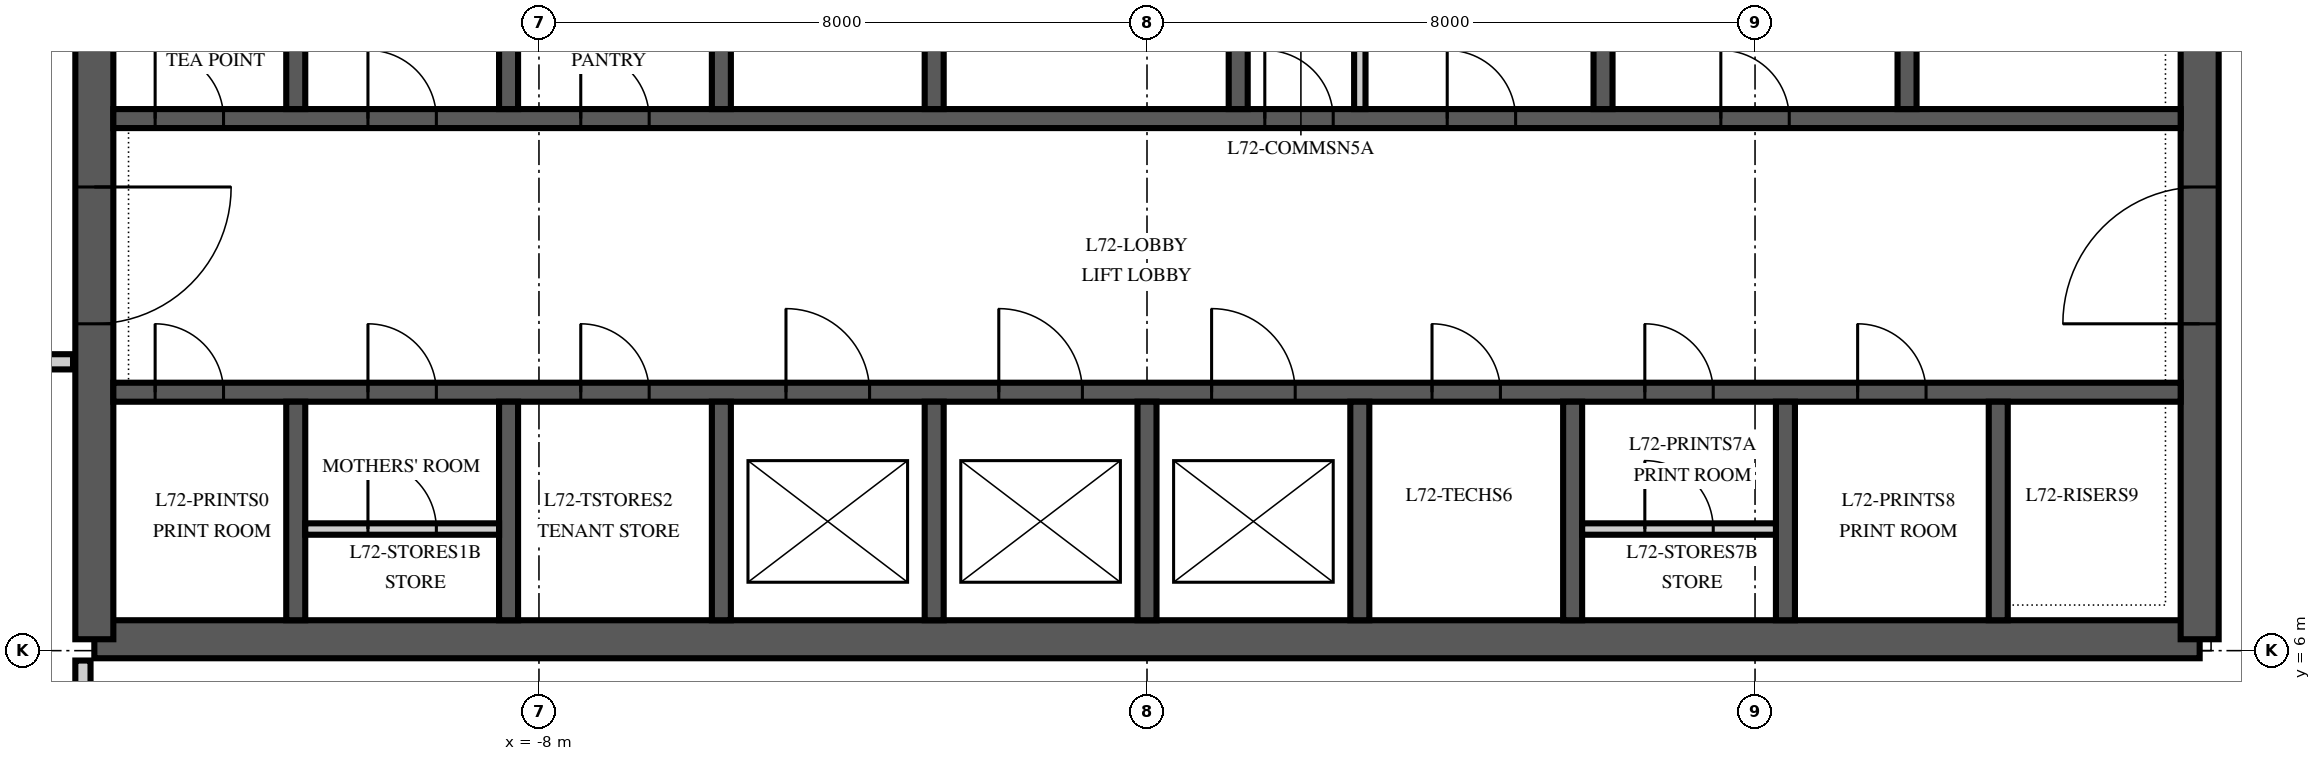
"""IFC4 building model, lengths in metres.
Left out: names, types, materials, properties, quantities, classifications, styles, units other than length and angle.
Written with IfcOpenShell. Run it as: python <this file> out.ifc"""

import sys

from ifc_helpers import new_model, si_unit, direction, frame, frame_2d, origin, place, context, subcontext, project, spatial, polyline, rectangle, outline, extrude, element, fill, save


model = new_model("IFC4")
c1 = context("Model", 3, precision=1e-05, world=origin(), true_north=direction((0.0, 1.0)))
c2 = subcontext(c1, "Body", "Model", "MODEL_VIEW")
j1 = project(units=[si_unit("LENGTHUNIT", "METRE"), si_unit("PLANEANGLEUNIT", "RADIAN")], contexts=[c1])
p1 = place(None, origin())
s1 = spatial("IfcSite", under=j1, at=p1, CompositionType="ELEMENT")
p2 = place(p1, origin())
s2 = spatial("IfcBuilding", under=s1, at=p2, CompositionType="ELEMENT")
p3 = place(p2, frame((0.0, 0.0, 308.0)))
s3 = spatial("IfcBuildingStorey", under=s2, at=p3, CompositionType="ELEMENT", Elevation=308.0)
p4 = place(p3, frame((-13.85, 6.15, 0.0), z_axis=(0.0, 0.0, 1.0), x_axis=(1.0, 0.0, 0.0)))
e1 = element("IfcWall", 1, at=p4, inside=s3, PredefinedType="SHEAR", context=c2, shape_type="SweptSolid", body=[
    extrude(rectangle(XDim=27.7, YDim=0.5, at=frame_2d((13.85, 0.0))), origin(), (0.0, 0.0, 1.0), 4.0),
])
p5 = place(p3, frame((13.85, 6.15, 0.0), z_axis=(0.0, 0.0, 1.0), x_axis=(0.0, 1.0, 0.0)))
e2 = element("IfcWall", 2, at=p5, inside=s3, PredefinedType="SHEAR", context=c2, shape_type="SweptSolid", body=[
    extrude(outline(polyline([(0.0, -0.25), (17.7, -0.25), (17.7, 0.0), (17.45, 0.0), (17.45, 0.25), (0.25, 0.25), (0.25, 0.0), (0.0, 0.0), (0.0, -0.25)])), origin(), (0.0, 0.0, 1.0), 4.0),
])
p6 = place(p5, frame((4.15, 0.0, 0.0)))
e3 = element("IfcOpeningElement", 3, at=p6, cuts=e2, PredefinedType="OPENING", context=c2, shape_type="SweptSolid", body=[
    extrude(rectangle(XDim=1.8, YDim=2.4, at=frame_2d((0.9, 1.2))), frame((0.0, 0.265, 0.0), z_axis=(0.0, -1.0, 0.0), x_axis=(1.0, 0.0, 0.0)), (0.0, 0.0, 1.0), 0.53),
])
p7 = place(p3, frame((-13.85, 23.85, 0.0), z_axis=(0.0, 0.0, 1.0), x_axis=(0.0, -1.0, 0.0)))
e4 = element("IfcWall", 4, at=p7, inside=s3, PredefinedType="SHEAR", context=c2, shape_type="SweptSolid", body=[
    extrude(outline(polyline([(0.0, -0.25), (17.7, -0.25), (17.7, 0.0), (17.45, 0.0), (17.45, 0.25), (0.25, 0.25), (0.25, 0.0), (0.0, 0.0), (0.0, -0.25)])), origin(), (0.0, 0.0, 1.0), 4.0),
])
p8 = place(p7, frame((11.75, 0.0, 0.0)))
e5 = element("IfcOpeningElement", 5, at=p8, cuts=e4, PredefinedType="OPENING", context=c2, shape_type="SweptSolid", body=[
    extrude(rectangle(XDim=1.8, YDim=2.4, at=frame_2d((0.9, 1.2))), frame((0.0, 0.265, 0.0), z_axis=(0.0, -1.0, 0.0), x_axis=(1.0, 0.0, 0.0)), (0.0, 0.0, 1.0), 0.53),
])
p9 = place(p3, frame((-13.6, 9.4, 0.0), z_axis=(0.0, 0.0, 1.0), x_axis=(1.0, 0.0, 0.0)))
e6 = element("IfcWall", 6, at=p9, inside=s3, PredefinedType="SHEAR", context=c2, shape_type="SweptSolid", body=[
    extrude(rectangle(XDim=27.2, YDim=0.25, at=frame_2d((13.6, 0.0))), origin(), (0.0, 0.0, 1.0), 4.0),
])
p10 = place(p9, frame((8.85, 0.0, 0.0)))
e7 = element("IfcOpeningElement", 7, at=p10, cuts=e6, PredefinedType="OPENING", context=c2, shape_type="SweptSolid", body=[
    extrude(rectangle(XDim=1.1, YDim=2.1, at=frame_2d((0.55, 1.05))), frame((0.0, 0.14, 0.0), z_axis=(0.0, -1.0, 0.0), x_axis=(1.0, 0.0, 0.0)), (0.0, 0.0, 1.0), 0.28),
])
p11 = place(p9, frame((11.65, 0.0, 0.0)))
e8 = element("IfcOpeningElement", 8, at=p11, cuts=e6, PredefinedType="OPENING", context=c2, shape_type="SweptSolid", body=[
    extrude(rectangle(XDim=1.1, YDim=2.1, at=frame_2d((0.55, 1.05))), frame((0.0, 0.14, 0.0), z_axis=(0.0, -1.0, 0.0), x_axis=(1.0, 0.0, 0.0)), (0.0, 0.0, 1.0), 0.28),
])
p12 = place(p9, frame((14.45, 0.0, 0.0)))
e9 = element("IfcOpeningElement", 9, at=p12, cuts=e6, PredefinedType="OPENING", context=c2, shape_type="SweptSolid", body=[
    extrude(rectangle(XDim=1.1, YDim=2.1, at=frame_2d((0.55, 1.05))), frame((0.0, 0.14, 0.0), z_axis=(0.0, -1.0, 0.0), x_axis=(1.0, 0.0, 0.0)), (0.0, 0.0, 1.0), 0.28),
])
p13 = place(p9, frame((0.55, 0.0, 0.0)))
e10 = element("IfcOpeningElement", 10, at=p13, cuts=e6, PredefinedType="OPENING", context=c2, shape_type="SweptSolid", body=[
    extrude(rectangle(XDim=0.9, YDim=2.1, at=frame_2d((0.45, 1.05))), frame((0.0, 0.14, 0.0), z_axis=(0.0, -1.0, 0.0), x_axis=(1.0, 0.0, 0.0)), (0.0, 0.0, 1.0), 0.28),
])
p14 = place(p9, frame((3.35, 0.0, 0.0)))
e11 = element("IfcOpeningElement", 11, at=p14, cuts=e6, PredefinedType="OPENING", context=c2, shape_type="SweptSolid", body=[
    extrude(rectangle(XDim=0.9, YDim=2.1, at=frame_2d((0.45, 1.05))), frame((0.0, 0.14, 0.0), z_axis=(0.0, -1.0, 0.0), x_axis=(1.0, 0.0, 0.0)), (0.0, 0.0, 1.0), 0.28),
])
p15 = place(p9, frame((6.15, 0.0, 0.0)))
e12 = element("IfcOpeningElement", 12, at=p15, cuts=e6, PredefinedType="OPENING", context=c2, shape_type="SweptSolid", body=[
    extrude(rectangle(XDim=0.9, YDim=2.1, at=frame_2d((0.45, 1.05))), frame((0.0, 0.14, 0.0), z_axis=(0.0, -1.0, 0.0), x_axis=(1.0, 0.0, 0.0)), (0.0, 0.0, 1.0), 0.28),
])
p16 = place(p9, frame((17.35, 0.0, 0.0)))
e13 = element("IfcOpeningElement", 13, at=p16, cuts=e6, PredefinedType="OPENING", context=c2, shape_type="SweptSolid", body=[
    extrude(rectangle(XDim=0.9, YDim=2.1, at=frame_2d((0.45, 1.05))), frame((0.0, 0.14, 0.0), z_axis=(0.0, -1.0, 0.0), x_axis=(1.0, 0.0, 0.0)), (0.0, 0.0, 1.0), 0.28),
])
p17 = place(p9, frame((20.15, 0.0, 0.0)))
e14 = element("IfcOpeningElement", 14, at=p17, cuts=e6, PredefinedType="OPENING", context=c2, shape_type="SweptSolid", body=[
    extrude(rectangle(XDim=0.9, YDim=2.1, at=frame_2d((0.45, 1.05))), frame((0.0, 0.14, 0.0), z_axis=(0.0, -1.0, 0.0), x_axis=(1.0, 0.0, 0.0)), (0.0, 0.0, 1.0), 0.28),
])
p18 = place(p9, frame((22.95, 0.0, 0.0)))
e15 = element("IfcOpeningElement", 15, at=p18, cuts=e6, PredefinedType="OPENING", context=c2, shape_type="SweptSolid", body=[
    extrude(rectangle(XDim=0.9, YDim=2.1, at=frame_2d((0.45, 1.05))), frame((0.0, 0.14, 0.0), z_axis=(0.0, -1.0, 0.0), x_axis=(1.0, 0.0, 0.0)), (0.0, 0.0, 1.0), 0.28),
])
p19 = place(p3, frame((-13.6, 13.0, 0.0), z_axis=(0.0, 0.0, 1.0), x_axis=(1.0, 0.0, 0.0)))
e16 = element("IfcWall", 16, at=p19, inside=s3, PredefinedType="SHEAR", context=c2, shape_type="SweptSolid", body=[
    extrude(rectangle(XDim=27.2, YDim=0.25, at=frame_2d((13.6, 0.0))), origin(), (0.0, 0.0, 1.0), 4.0),
])
p20 = place(p19, frame((15.15, 0.0, 0.0)))
e17 = element("IfcOpeningElement", 17, at=p20, cuts=e16, PredefinedType="OPENING", context=c2, shape_type="SweptSolid", body=[
    extrude(rectangle(XDim=0.9, YDim=2.1, at=frame_2d((0.45, 1.05))), frame((0.0, 0.14, 0.0), z_axis=(0.0, -1.0, 0.0), x_axis=(1.0, 0.0, 0.0)), (0.0, 0.0, 1.0), 0.28),
])
p21 = place(p19, frame((17.55, 0.0, 0.0)))
e18 = element("IfcOpeningElement", 18, at=p21, cuts=e16, PredefinedType="OPENING", context=c2, shape_type="SweptSolid", body=[
    extrude(rectangle(XDim=0.9, YDim=2.1, at=frame_2d((0.45, 1.05))), frame((0.0, 0.14, 0.0), z_axis=(0.0, -1.0, 0.0), x_axis=(1.0, 0.0, 0.0)), (0.0, 0.0, 1.0), 0.28),
])
p22 = place(p19, frame((21.15, 0.0, 0.0)))
e19 = element("IfcOpeningElement", 19, at=p22, cuts=e16, PredefinedType="OPENING", context=c2, shape_type="SweptSolid", body=[
    extrude(rectangle(XDim=0.9, YDim=2.1, at=frame_2d((0.45, 1.05))), frame((0.0, 0.14, 0.0), z_axis=(0.0, -1.0, 0.0), x_axis=(1.0, 0.0, 0.0)), (0.0, 0.0, 1.0), 0.28),
])
p23 = place(p19, frame((0.55, 0.0, 0.0)))
e20 = element("IfcOpeningElement", 20, at=p23, cuts=e16, PredefinedType="OPENING", context=c2, shape_type="SweptSolid", body=[
    extrude(rectangle(XDim=0.9, YDim=2.1, at=frame_2d((0.45, 1.05))), frame((0.0, 0.14, 0.0), z_axis=(0.0, -1.0, 0.0), x_axis=(1.0, 0.0, 0.0)), (0.0, 0.0, 1.0), 0.28),
])
p24 = place(p19, frame((3.35, 0.0, 0.0)))
e21 = element("IfcOpeningElement", 21, at=p24, cuts=e16, PredefinedType="OPENING", context=c2, shape_type="SweptSolid", body=[
    extrude(rectangle(XDim=0.9, YDim=2.1, at=frame_2d((0.45, 1.05))), frame((0.0, 0.14, 0.0), z_axis=(0.0, -1.0, 0.0), x_axis=(1.0, 0.0, 0.0)), (0.0, 0.0, 1.0), 0.28),
])
p25 = place(p19, frame((6.15, 0.0, 0.0)))
e22 = element("IfcOpeningElement", 22, at=p25, cuts=e16, PredefinedType="OPENING", context=c2, shape_type="SweptSolid", body=[
    extrude(rectangle(XDim=0.9, YDim=2.1, at=frame_2d((0.45, 1.05))), frame((0.0, 0.14, 0.0), z_axis=(0.0, -1.0, 0.0), x_axis=(1.0, 0.0, 0.0)), (0.0, 0.0, 1.0), 0.28),
])
for number, where, z_axis, x_axis in (
    (23, (-11.2, 6.4, 0.0), (0.0, 0.0, 1.0), (0.0, 1.0, 0.0)),
    (24, (-8.4, 6.4, 0.0), (0.0, 0.0, 1.0), (0.0, 1.0, 0.0)),
    (25, (-5.6, 6.4, 0.0), (0.0, 0.0, 1.0), (0.0, 1.0, 0.0)),
    (26, (-2.8, 6.4, 0.0), (0.0, 0.0, 1.0), (0.0, 1.0, 0.0)),
    (27, (0.0, 6.4, 0.0), (0.0, 0.0, 1.0), (0.0, 1.0, 0.0)),
    (28, (2.8, 6.4, 0.0), (0.0, 0.0, 1.0), (0.0, 1.0, 0.0)),
    (29, (5.6, 6.4, 0.0), (0.0, 0.0, 1.0), (0.0, 1.0, 0.0)),
    (30, (8.4, 6.4, 0.0), (0.0, 0.0, 1.0), (0.0, 1.0, 0.0)),
    (31, (11.2, 6.4, 0.0), (0.0, 0.0, 1.0), (0.0, 1.0, 0.0)),
):
    element("IfcWall", number, at=place(p3, frame(where, z_axis=z_axis, x_axis=x_axis)), inside=s3, PredefinedType="SHEAR", context=c2, shape_type="SweptSolid", body=[
        extrude(rectangle(XDim=2.875, YDim=0.25, at=frame_2d((1.438, 0.0))), origin(), (0.0, 0.0, 1.0), 4.0),
    ])
for number, where, z_axis, x_axis in (
    (32, (-11.2, 13.125, 0.0), (0.0, 0.0, 1.0), (0.0, 1.0, 0.0)),
    (33, (-8.4, 13.125, 0.0), (0.0, 0.0, 1.0), (0.0, 1.0, 0.0)),
    (34, (-5.6, 13.125, 0.0), (0.0, 0.0, 1.0), (0.0, 1.0, 0.0)),
    (35, (-2.8, 13.125, 0.0), (0.0, 0.0, 1.0), (0.0, 1.0, 0.0)),
    (36, (1.2, 13.125, 0.0), (0.0, 0.0, 1.0), (0.0, 1.0, 0.0)),
    (37, (6.0, 13.125, 0.0), (0.0, 0.0, 1.0), (0.0, 1.0, 0.0)),
    (38, (10.0, 13.125, 0.0), (0.0, 0.0, 1.0), (0.0, 1.0, 0.0)),
):
    element("IfcWall", number, at=place(p3, frame(where, z_axis=z_axis, x_axis=x_axis)), inside=s3, PredefinedType="SHEAR", context=c2, shape_type="SweptSolid", body=[
        extrude(rectangle(XDim=2.75, YDim=0.25, at=frame_2d((1.375, 0.0))), origin(), (0.0, 0.0, 1.0), 4.0),
    ])
p26 = place(p3, frame((2.8, 13.125, 0.0), z_axis=(0.0, 0.0, 1.0), x_axis=(0.0, 1.0, 0.0)))
e39 = element("IfcWall", 39, at=p26, inside=s3, PredefinedType="PARTITIONING", context=c2, shape_type="SweptSolid", body=[
    extrude(rectangle(XDim=2.75, YDim=0.15, at=frame_2d((1.375, 0.0))), origin(), (0.0, 0.0, 1.0), 3.85),
])
p27 = place(p3, frame((-11.075, 7.6, 0.0), z_axis=(0.0, 0.0, 1.0), x_axis=(1.0, 0.0, 0.0)))
e40 = element("IfcWall", 40, at=p27, inside=s3, PredefinedType="PARTITIONING", context=c2, shape_type="SweptSolid", body=[
    extrude(rectangle(XDim=2.55, YDim=0.15, at=frame_2d((1.275, 0.0))), origin(), (0.0, 0.0, 1.0), 3.85),
])
p28 = place(p27, frame((0.825, 0.0, 0.0)))
e41 = element("IfcOpeningElement", 41, at=p28, cuts=e40, PredefinedType="OPENING", context=c2, shape_type="SweptSolid", body=[
    extrude(rectangle(XDim=0.9, YDim=2.1, at=frame_2d((0.45, 1.05))), frame((0.0, 0.09, 0.0), z_axis=(0.0, -1.0, 0.0), x_axis=(1.0, 0.0, 0.0)), (0.0, 0.0, 1.0), 0.18),
])
p29 = place(p3, frame((5.725, 7.6, 0.0), z_axis=(0.0, 0.0, 1.0), x_axis=(1.0, 0.0, 0.0)))
e42 = element("IfcWall", 42, at=p29, inside=s3, PredefinedType="PARTITIONING", context=c2, shape_type="SweptSolid", body=[
    extrude(rectangle(XDim=2.55, YDim=0.15, at=frame_2d((1.275, 0.0))), origin(), (0.0, 0.0, 1.0), 3.85),
])
p30 = place(p29, frame((0.825, 0.0, 0.0)))
e43 = element("IfcOpeningElement", 43, at=p30, cuts=e42, PredefinedType="OPENING", context=c2, shape_type="SweptSolid", body=[
    extrude(rectangle(XDim=0.9, YDim=2.1, at=frame_2d((0.45, 1.05))), frame((0.0, 0.09, 0.0), z_axis=(0.0, -1.0, 0.0), x_axis=(1.0, 0.0, 0.0)), (0.0, 0.0, 1.0), 0.18),
])
p31 = place(p3, frame((-16.15, 9.8, 0.0), z_axis=(0.0, 0.0, 1.0), x_axis=(1.0, 0.0, 0.0)))
e44 = element("IfcWall", 44, at=p31, inside=s3, PredefinedType="PARTITIONING", context=c2, shape_type="SweptSolid", body=[
    extrude(rectangle(XDim=2.02, YDim=0.2, at=frame_2d((1.01, 0.0))), origin(), (0.0, 0.0, 1.0), 3.85),
])
p32 = place(p3, frame((-14.0, 3.675, 0.0), z_axis=(0.0, 0.0, 1.0), x_axis=(0.0, 1.0, 0.0)))
e45 = element("IfcWall", 45, at=p32, inside=s3, PredefinedType="PARTITIONING", context=c2, shape_type="SweptSolid", body=[
    extrude(rectangle(XDim=2.195, YDim=0.2, at=frame_2d((1.098, 0.0))), origin(), (0.0, 0.0, 1.0), 3.23),
])
p33 = place(p6, origin())
e46 = element("IfcDoor", 46, at=p33, inside=s3, OperationType="DOUBLE_DOOR_SINGLE_SWING", PredefinedType="DOOR", context=c2, shape_type="SweptSolid", body=[
    extrude(rectangle(XDim=1.8, YDim=2.4, at=frame_2d((0.9, 1.2))), frame((0.0, 0.25, 0.0), z_axis=(0.0, -1.0, 0.0), x_axis=(1.0, 0.0, 0.0)), (0.0, 0.0, 1.0), 0.5),
])
fill(e3, e46)
p34 = place(p8, origin())
e47 = element("IfcDoor", 47, at=p34, inside=s3, OperationType="DOUBLE_DOOR_SINGLE_SWING", PredefinedType="DOOR", context=c2, shape_type="SweptSolid", body=[
    extrude(rectangle(XDim=1.8, YDim=2.4, at=frame_2d((0.9, 1.2))), frame((0.0, 0.25, 0.0), z_axis=(0.0, -1.0, 0.0), x_axis=(1.0, 0.0, 0.0)), (0.0, 0.0, 1.0), 0.5),
])
fill(e5, e47)
p35 = place(p10, origin())
e48 = element("IfcDoor", 48, at=p35, inside=s3, OperationType="SLIDING_TO_LEFT", PredefinedType="DOOR", context=c2, shape_type="SweptSolid", body=[
    extrude(rectangle(XDim=1.1, YDim=2.1, at=frame_2d((0.55, 1.05))), frame((0.0, 0.125, 0.0), z_axis=(0.0, -1.0, 0.0), x_axis=(1.0, 0.0, 0.0)), (0.0, 0.0, 1.0), 0.25),
])
fill(e7, e48)
p36 = place(p11, origin())
e49 = element("IfcDoor", 49, at=p36, inside=s3, OperationType="SLIDING_TO_LEFT", PredefinedType="DOOR", context=c2, shape_type="SweptSolid", body=[
    extrude(rectangle(XDim=1.1, YDim=2.1, at=frame_2d((0.55, 1.05))), frame((0.0, 0.125, 0.0), z_axis=(0.0, -1.0, 0.0), x_axis=(1.0, 0.0, 0.0)), (0.0, 0.0, 1.0), 0.25),
])
fill(e8, e49)
p37 = place(p12, origin())
e50 = element("IfcDoor", 50, at=p37, inside=s3, OperationType="SLIDING_TO_LEFT", PredefinedType="DOOR", context=c2, shape_type="SweptSolid", body=[
    extrude(rectangle(XDim=1.1, YDim=2.1, at=frame_2d((0.55, 1.05))), frame((0.0, 0.125, 0.0), z_axis=(0.0, -1.0, 0.0), x_axis=(1.0, 0.0, 0.0)), (0.0, 0.0, 1.0), 0.25),
])
fill(e9, e50)
p38 = place(p20, origin())
e51 = element("IfcDoor", 51, at=p38, inside=s3, OperationType="SINGLE_SWING_LEFT", PredefinedType="DOOR", context=c2, shape_type="SweptSolid", body=[
    extrude(rectangle(XDim=0.9, YDim=2.1, at=frame_2d((0.45, 1.05))), frame((0.0, 0.125, 0.0), z_axis=(0.0, -1.0, 0.0), x_axis=(1.0, 0.0, 0.0)), (0.0, 0.0, 1.0), 0.25),
])
fill(e17, e51)
p39 = place(p21, origin())
e52 = element("IfcDoor", 52, at=p39, inside=s3, OperationType="SINGLE_SWING_LEFT", PredefinedType="DOOR", context=c2, shape_type="SweptSolid", body=[
    extrude(rectangle(XDim=0.9, YDim=2.1, at=frame_2d((0.45, 1.05))), frame((0.0, 0.125, 0.0), z_axis=(0.0, -1.0, 0.0), x_axis=(1.0, 0.0, 0.0)), (0.0, 0.0, 1.0), 0.25),
])
fill(e18, e52)
p40 = place(p22, origin())
e53 = element("IfcDoor", 53, at=p40, inside=s3, OperationType="SINGLE_SWING_LEFT", PredefinedType="DOOR", context=c2, shape_type="SweptSolid", body=[
    extrude(rectangle(XDim=0.9, YDim=2.1, at=frame_2d((0.45, 1.05))), frame((0.0, 0.125, 0.0), z_axis=(0.0, -1.0, 0.0), x_axis=(1.0, 0.0, 0.0)), (0.0, 0.0, 1.0), 0.25),
])
fill(e19, e53)
p41 = place(p23, origin())
e54 = element("IfcDoor", 54, at=p41, inside=s3, OperationType="SINGLE_SWING_LEFT", PredefinedType="DOOR", context=c2, shape_type="SweptSolid", body=[
    extrude(rectangle(XDim=0.9, YDim=2.1, at=frame_2d((0.45, 1.05))), frame((0.0, 0.125, 0.0), z_axis=(0.0, -1.0, 0.0), x_axis=(1.0, 0.0, 0.0)), (0.0, 0.0, 1.0), 0.25),
])
fill(e20, e54)
p42 = place(p24, origin())
e55 = element("IfcDoor", 55, at=p42, inside=s3, OperationType="SINGLE_SWING_LEFT", PredefinedType="DOOR", context=c2, shape_type="SweptSolid", body=[
    extrude(rectangle(XDim=0.9, YDim=2.1, at=frame_2d((0.45, 1.05))), frame((0.0, 0.125, 0.0), z_axis=(0.0, -1.0, 0.0), x_axis=(1.0, 0.0, 0.0)), (0.0, 0.0, 1.0), 0.25),
])
fill(e21, e55)
p43 = place(p25, origin())
e56 = element("IfcDoor", 56, at=p43, inside=s3, OperationType="SINGLE_SWING_LEFT", PredefinedType="DOOR", context=c2, shape_type="SweptSolid", body=[
    extrude(rectangle(XDim=0.9, YDim=2.1, at=frame_2d((0.45, 1.05))), frame((0.0, 0.125, 0.0), z_axis=(0.0, -1.0, 0.0), x_axis=(1.0, 0.0, 0.0)), (0.0, 0.0, 1.0), 0.25),
])
fill(e22, e56)
p44 = place(p13, origin())
e57 = element("IfcDoor", 57, at=p44, inside=s3, OperationType="SINGLE_SWING_LEFT", PredefinedType="DOOR", context=c2, shape_type="SweptSolid", body=[
    extrude(rectangle(XDim=0.9, YDim=2.1, at=frame_2d((0.45, 1.05))), frame((0.0, 0.125, 0.0), z_axis=(0.0, -1.0, 0.0), x_axis=(1.0, 0.0, 0.0)), (0.0, 0.0, 1.0), 0.25),
])
fill(e10, e57)
p45 = place(p14, origin())
e58 = element("IfcDoor", 58, at=p45, inside=s3, OperationType="SINGLE_SWING_LEFT", PredefinedType="DOOR", context=c2, shape_type="SweptSolid", body=[
    extrude(rectangle(XDim=0.9, YDim=2.1, at=frame_2d((0.45, 1.05))), frame((0.0, 0.125, 0.0), z_axis=(0.0, -1.0, 0.0), x_axis=(1.0, 0.0, 0.0)), (0.0, 0.0, 1.0), 0.25),
])
fill(e11, e58)
p46 = place(p28, origin())
e59 = element("IfcDoor", 59, at=p46, inside=s3, OperationType="SINGLE_SWING_LEFT", PredefinedType="DOOR", context=c2, shape_type="SweptSolid", body=[
    extrude(rectangle(XDim=0.9, YDim=2.1, at=frame_2d((0.45, 1.05))), frame((0.0, 0.075, 0.0), z_axis=(0.0, -1.0, 0.0), x_axis=(1.0, 0.0, 0.0)), (0.0, 0.0, 1.0), 0.149),
])
fill(e41, e59)
p47 = place(p15, origin())
e60 = element("IfcDoor", 60, at=p47, inside=s3, OperationType="SINGLE_SWING_LEFT", PredefinedType="DOOR", context=c2, shape_type="SweptSolid", body=[
    extrude(rectangle(XDim=0.9, YDim=2.1, at=frame_2d((0.45, 1.05))), frame((0.0, 0.125, 0.0), z_axis=(0.0, -1.0, 0.0), x_axis=(1.0, 0.0, 0.0)), (0.0, 0.0, 1.0), 0.25),
])
fill(e12, e60)
p48 = place(p16, origin())
e61 = element("IfcDoor", 61, at=p48, inside=s3, OperationType="SINGLE_SWING_LEFT", PredefinedType="DOOR", context=c2, shape_type="SweptSolid", body=[
    extrude(rectangle(XDim=0.9, YDim=2.1, at=frame_2d((0.45, 1.05))), frame((0.0, 0.125, 0.0), z_axis=(0.0, -1.0, 0.0), x_axis=(1.0, 0.0, 0.0)), (0.0, 0.0, 1.0), 0.25),
])
fill(e13, e61)
p49 = place(p17, origin())
e62 = element("IfcDoor", 62, at=p49, inside=s3, OperationType="SINGLE_SWING_LEFT", PredefinedType="DOOR", context=c2, shape_type="SweptSolid", body=[
    extrude(rectangle(XDim=0.9, YDim=2.1, at=frame_2d((0.45, 1.05))), frame((0.0, 0.125, 0.0), z_axis=(0.0, -1.0, 0.0), x_axis=(1.0, 0.0, 0.0)), (0.0, 0.0, 1.0), 0.25),
])
fill(e14, e62)
p50 = place(p30, origin())
e63 = element("IfcDoor", 63, at=p50, inside=s3, OperationType="SINGLE_SWING_LEFT", PredefinedType="DOOR", context=c2, shape_type="SweptSolid", body=[
    extrude(rectangle(XDim=0.9, YDim=2.1, at=frame_2d((0.45, 1.05))), frame((0.0, 0.075, 0.0), z_axis=(0.0, -1.0, 0.0), x_axis=(1.0, 0.0, 0.0)), (0.0, 0.0, 1.0), 0.149),
])
fill(e43, e63)
p51 = place(p18, origin())
e64 = element("IfcDoor", 64, at=p51, inside=s3, OperationType="SINGLE_SWING_LEFT", PredefinedType="DOOR", context=c2, shape_type="SweptSolid", body=[
    extrude(rectangle(XDim=0.9, YDim=2.1, at=frame_2d((0.45, 1.05))), frame((0.0, 0.125, 0.0), z_axis=(0.0, -1.0, 0.0), x_axis=(1.0, 0.0, 0.0)), (0.0, 0.0, 1.0), 0.25),
])
fill(e15, e64)
save(model, sys.argv[1])
